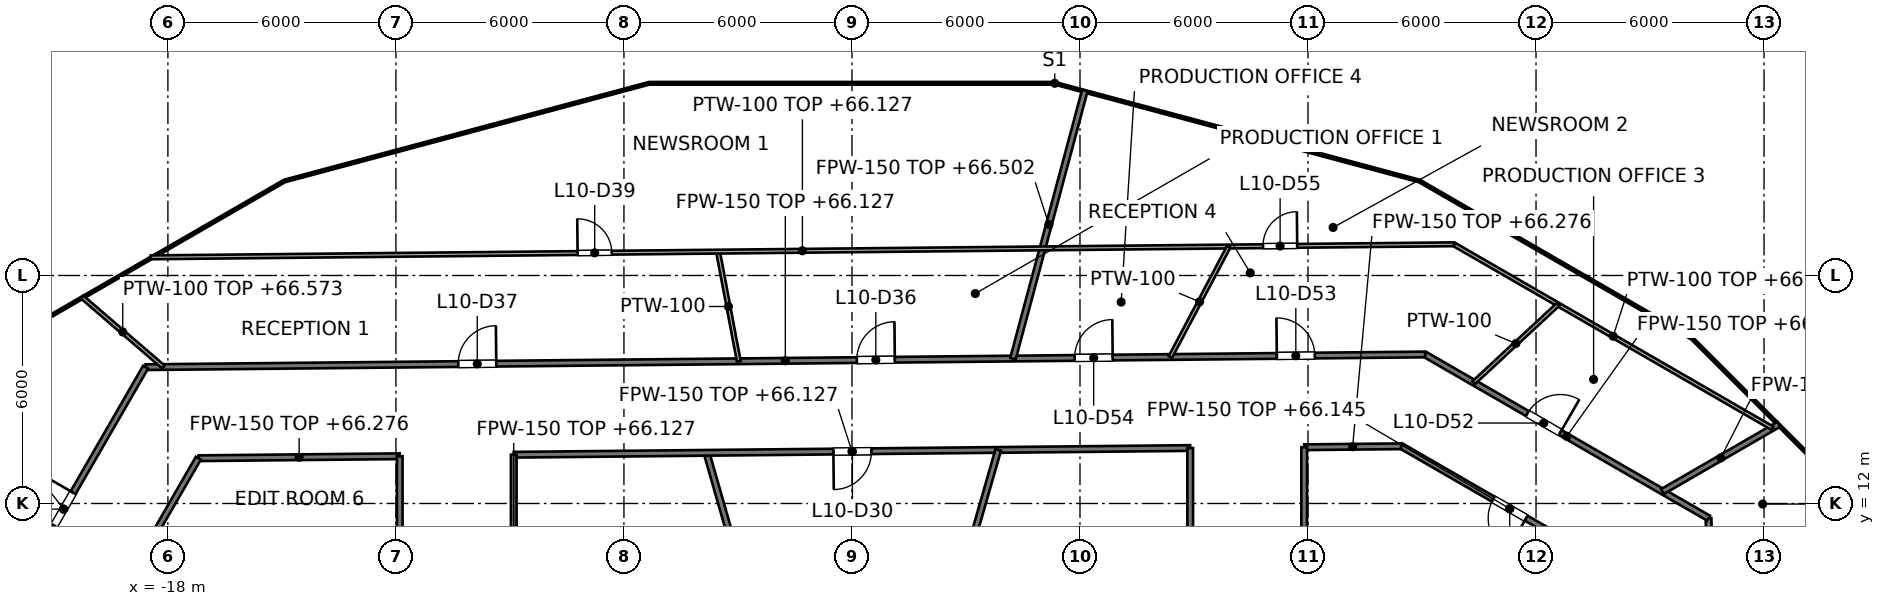
"""IFC4 building model, lengths in metres.
Left out: names, types, materials, properties, quantities, classifications, styles, units other than length and angle.
Written with IfcOpenShell. Run it as: python <this file> out.ifc"""

import sys

from ifc_helpers import new_model, si_unit, direction, frame, frame_2d, origin, place, context, subcontext, project, spatial, rectangle, extrude, element, fill, save


model = new_model("IFC4")
c1 = context("Model", 3, precision=1e-05, world=origin(), true_north=direction((0.0, 1.0)))
c2 = subcontext(c1, "Body", "Model", "MODEL_VIEW")
j1 = project(units=[si_unit("LENGTHUNIT", "METRE"), si_unit("PLANEANGLEUNIT", "RADIAN")], contexts=[c1])
p1 = place(None, origin())
s1 = spatial("IfcSite", under=j1, at=p1, CompositionType="ELEMENT")
p2 = place(p1, origin())
s2 = spatial("IfcBuilding", under=s1, at=p2, CompositionType="ELEMENT")
p3 = place(p2, frame((0.0, 0.0, 63.0)))
s3 = spatial("IfcBuildingStorey", under=s2, at=p3, CompositionType="ELEMENT", Elevation=63.0)
p4 = place(p3, frame((22.539, 11.615, 0.0), z_axis=(0.0, 0.0, 1.0), x_axis=(0.020626332176, -0.99978725458, 0.0)))
e1 = element("IfcWall", 1, at=p4, inside=s3, PredefinedType="PARTITIONING", context=c2, shape_type="SweptSolid", body=[
    extrude(rectangle(XDim=19.66, YDim=0.15, at=frame_2d((9.83, 0.0))), origin(), (0.0, 0.0, 1.0), 3.077),
])
p5 = place(p4, frame((9.33, 0.0, 0.0)))
e2 = element("IfcOpeningElement", 2, at=p5, cuts=e1, PredefinedType="OPENING", context=c2, shape_type="SweptSolid", body=[
    extrude(rectangle(XDim=1.0, YDim=2.1, at=frame_2d((0.5, 1.05))), frame((0.0, 0.075, 0.0), z_axis=(0.0, -1.0, 0.0), x_axis=(1.0, 0.0, 0.0)), (0.0, 0.0, 1.0), 0.15),
])
p6 = place(p3, frame((-3.827, 13.333, 0.0), z_axis=(0.0, 0.0, 1.0), x_axis=(0.275935525478, -0.961176147113, 0.0)))
e3 = element("IfcWall", 3, at=p6, inside=s3, PredefinedType="PARTITIONING", context=c2, shape_type="SweptSolid", body=[
    extrude(rectangle(XDim=5.548, YDim=0.15, at=frame_2d((2.774, 0.0))), origin(), (0.0, 0.0, 1.0), 4.05),
])
p7 = place(p3, frame((14.448, 13.515, 0.0), z_axis=(0.0, 0.0, 1.0), x_axis=(0.866016279763, -0.500015802937, 0.0)))
e4 = element("IfcWall", 4, at=p7, inside=s3, PredefinedType="PARTITIONING", context=c2, shape_type="SweptSolid", body=[
    extrude(rectangle(XDim=6.604, YDim=0.15, at=frame_2d((3.302, 0.0))), origin(), (0.0, 0.0, 1.0), 3.145),
])
p8 = place(p7, frame((2.802, 0.0, 0.0)))
e5 = element("IfcOpeningElement", 5, at=p8, cuts=e4, PredefinedType="OPENING", context=c2, shape_type="SweptSolid", body=[
    extrude(rectangle(XDim=1.0, YDim=2.1, at=frame_2d((0.5, 1.05))), frame((0.0, 0.075, 0.0), z_axis=(0.0, -1.0, 0.0), x_axis=(1.0, 0.0, 0.0)), (0.0, 0.0, 1.0), 0.15),
])
p9 = place(p3, frame((15.08, 15.921, 0.0), z_axis=(0.0, 0.0, 1.0), x_axis=(0.866020838546, -0.500007907142, 0.0)))
e6 = element("IfcWall", 6, at=p9, inside=s3, PredefinedType="PARTITIONING", context=c2, shape_type="SweptSolid", body=[
    extrude(rectangle(XDim=8.613, YDim=0.15, at=frame_2d((4.306, 0.0))), origin(), (0.0, 0.0, 1.0), 3.145),
])
p10 = place(p9, frame((3.108, 0.0, 0.0)))
e7 = element("IfcOpeningElement", 7, at=p10, cuts=e6, PredefinedType="OPENING", context=c2, shape_type="SweptSolid", body=[
    extrude(rectangle(XDim=1.0, YDim=2.1, at=frame_2d((0.5, 1.05))), frame((0.0, 0.075, 0.0), z_axis=(0.0, -1.0, 0.0), x_axis=(1.0, 0.0, 0.0)), (0.0, 0.0, 1.0), 0.15),
])
p11 = place(p3, frame((-17.194, 13.191, 0.0), z_axis=(0.0, 0.0, 1.0), x_axis=(0.999950394899, 0.009960308291, 0.0)))
e8 = element("IfcWall", 8, at=p11, inside=s3, PredefinedType="PARTITIONING", context=c2, shape_type="SweptSolid", body=[
    extrude(rectangle(XDim=5.294, YDim=0.15, at=frame_2d((2.647, 0.0))), origin(), (0.0, 0.0, 1.0), 3.276),
])
p12 = place(p3, frame((-8.9, 13.282, 0.0), z_axis=(0.0, 0.0, 1.0), x_axis=(0.999950697987, 0.009929833562, 0.0)))
e9 = element("IfcWall", 9, at=p12, inside=s3, PredefinedType="PARTITIONING", context=c2, shape_type="SweptSolid", body=[
    extrude(rectangle(XDim=17.801, YDim=0.15, at=frame_2d((8.9, 0.0))), origin(), (0.0, 0.0, 1.0), 3.127),
])
p13 = place(p12, frame((8.412, 0.0, 0.0)))
e10 = element("IfcOpeningElement", 10, at=p13, cuts=e9, PredefinedType="OPENING", context=c2, shape_type="SweptSolid", body=[
    extrude(rectangle(XDim=1.0, YDim=2.1, at=frame_2d((0.5, 1.05))), frame((0.0, 0.075, 0.0), z_axis=(0.0, -1.0, 0.0), x_axis=(1.0, 0.0, 0.0)), (0.0, 0.0, 1.0), 0.15),
])
p14 = place(p3, frame((11.9, 13.48, 0.0), z_axis=(0.0, 0.0, 1.0), x_axis=(0.999950357576, 0.009964054536, 0.0)))
e11 = element("IfcWall", 11, at=p14, inside=s3, PredefinedType="PARTITIONING", context=c2, shape_type="SweptSolid", body=[
    extrude(rectangle(XDim=2.548, YDim=0.15, at=frame_2d((1.274, 0.0))), origin(), (0.0, 0.0, 1.0), 3.276),
])
p15 = place(p3, frame((-18.587, 15.587, 0.0), z_axis=(0.0, 0.0, 1.0), x_axis=(0.99995065417, 0.009934245078, 0.0)))
e12 = element("IfcWall", 12, at=p15, inside=s3, PredefinedType="PARTITIONING", context=c2, shape_type="SweptSolid", body=[
    extrude(rectangle(XDim=33.669, YDim=0.15, at=frame_2d((16.834, 0.0))), origin(), (0.0, 0.0, 1.0), 3.127),
])
p16 = place(p15, frame((18.716, 0.0, 0.0)))
e13 = element("IfcOpeningElement", 13, at=p16, cuts=e12, PredefinedType="OPENING", context=c2, shape_type="SweptSolid", body=[
    extrude(rectangle(XDim=1.0, YDim=2.1, at=frame_2d((0.5, 1.05))), frame((0.0, 0.075, 0.0), z_axis=(0.0, -1.0, 0.0), x_axis=(1.0, 0.0, 0.0)), (0.0, 0.0, 1.0), 0.15),
])
p17 = place(p15, frame((8.228, 0.0, 0.0)))
e14 = element("IfcOpeningElement", 14, at=p17, cuts=e12, PredefinedType="OPENING", context=c2, shape_type="SweptSolid", body=[
    extrude(rectangle(XDim=1.0, YDim=2.1, at=frame_2d((0.5, 1.05))), frame((0.0, 0.075, 0.0), z_axis=(0.0, -1.0, 0.0), x_axis=(1.0, 0.0, 0.0)), (0.0, 0.0, 1.0), 0.15),
])
p18 = place(p15, frame((29.768, 0.0, 0.0)))
e15 = element("IfcOpeningElement", 15, at=p18, cuts=e12, PredefinedType="OPENING", context=c2, shape_type="SweptSolid", body=[
    extrude(rectangle(XDim=1.0, YDim=2.1, at=frame_2d((0.5, 1.05))), frame((0.0, 0.075, 0.0), z_axis=(0.0, -1.0, 0.0), x_axis=(1.0, 0.0, 0.0)), (0.0, 0.0, 1.0), 0.15),
])
p19 = place(p15, frame((24.449, 0.0, 0.0)))
e16 = element("IfcOpeningElement", 16, at=p19, cuts=e12, PredefinedType="OPENING", context=c2, shape_type="SweptSolid", body=[
    extrude(rectangle(XDim=1.0, YDim=2.1, at=frame_2d((0.5, 1.05))), frame((0.0, 0.075, 0.0), z_axis=(0.0, -1.0, 0.0), x_axis=(1.0, 0.0, 0.0)), (0.0, 0.0, 1.0), 0.15),
])
p20 = place(p3, frame((21.328, 12.314, 0.0), z_axis=(0.0, 0.0, 1.0), x_axis=(0.865651247195, 0.500647498975, 0.0)))
e17 = element("IfcWall", 17, at=p20, inside=s3, PredefinedType="PARTITIONING", context=c2, shape_type="SweptSolid", body=[
    extrude(rectangle(XDim=3.54, YDim=0.15, at=frame_2d((1.77, 0.0))), origin(), (0.0, 0.0, 1.0), 3.302),
])
p21 = place(p3, frame((-20.5, 7.474, 0.0), z_axis=(0.0, 0.0, 1.0), x_axis=(0.500012665616, 0.866018091164, 0.0)))
e18 = element("IfcWall", 18, at=p21, inside=s3, PredefinedType="PARTITIONING", context=c2, shape_type="SweptSolid", body=[
    extrude(rectangle(XDim=6.602, YDim=0.15, at=frame_2d((3.301, 0.0))), origin(), (0.0, 0.0, 1.0), 3.195),
])
p22 = place(p21, frame((2.803, 0.0, 0.0)))
e19 = element("IfcOpeningElement", 19, at=p22, cuts=e18, PredefinedType="OPENING", context=c2, shape_type="SweptSolid", body=[
    extrude(rectangle(XDim=1.0, YDim=2.1, at=frame_2d((0.5, 1.05))), frame((0.0, 0.075, 0.0), z_axis=(0.0, -1.0, 0.0), x_axis=(1.0, 0.0, 0.0)), (0.0, 0.0, 1.0), 0.15),
])
p23 = place(p3, frame((-22.9, 8.117, 0.0), z_axis=(0.0, 0.0, 1.0), x_axis=(0.499983791763, 0.866034761412, 0.0)))
e20 = element("IfcWall", 20, at=p23, inside=s3, PredefinedType="PARTITIONING", context=c2, shape_type="SweptSolid", body=[
    extrude(rectangle(XDim=8.626, YDim=0.15, at=frame_2d((4.313, 0.0))), origin(), (0.0, 0.0, 1.0), 3.195),
])
p24 = place(p23, frame((3.812, 0.0, 0.0)))
e21 = element("IfcOpeningElement", 21, at=p24, cuts=e20, PredefinedType="OPENING", context=c2, shape_type="SweptSolid", body=[
    extrude(rectangle(XDim=1.0, YDim=2.1, at=frame_2d((0.5, 1.05))), frame((0.0, 0.075, 0.0), z_axis=(0.0, -1.0, 0.0), x_axis=(1.0, 0.0, 0.0)), (0.0, 0.0, 1.0), 0.15),
])
p25 = place(p3, frame((2.296, 8.0, 0.0), z_axis=(0.0, 0.0, 1.0), x_axis=(0.275958345059, 0.961169595749, 0.0)))
e22 = element("IfcWall", 22, at=p25, inside=s3, PredefinedType="PARTITIONING", context=c2, shape_type="SweptSolid", body=[
    extrude(rectangle(XDim=5.628, YDim=0.15, at=frame_2d((2.814, 0.0))), origin(), (0.0, 0.0, 1.0), 4.05),
])
p26 = place(p3, frame((4.237, 15.813, 0.0), z_axis=(0.0, 0.0, 1.0), x_axis=(0.258856971965, 0.965915663019, 0.0)))
e23 = element("IfcWall", 23, at=p26, inside=s3, PredefinedType="PARTITIONING", context=c2, shape_type="SweptSolid", body=[
    extrude(rectangle(XDim=7.302, YDim=0.15, at=frame_2d((3.651, 0.0))), origin(), (0.0, 0.0, 1.0), 3.502),
])
p27 = place(p3, frame((11.9, 8.0, 0.0), z_axis=(0.0, 0.0, 1.0), x_axis=(0.0, 1.0, 0.0)))
e24 = element("IfcWall", 24, at=p27, inside=s3, PredefinedType="PARTITIONING", context=c2, shape_type="SweptSolid", body=[
    extrude(rectangle(XDim=5.479, YDim=0.15, at=frame_2d((2.74, 0.0))), origin(), (0.0, 0.0, 1.0), 3.145),
])
p28 = place(p3, frame((8.9, 8.0, 0.0), z_axis=(0.0, 0.0, 1.0), x_axis=(0.0, 1.0, 0.0)))
e25 = element("IfcWall", 25, at=p28, inside=s3, PredefinedType="PARTITIONING", context=c2, shape_type="SweptSolid", body=[
    extrude(rectangle(XDim=5.46, YDim=0.15, at=frame_2d((2.73, 0.0))), origin(), (0.0, 0.0, 1.0), 3.127),
])
p29 = place(p28, frame((2.23, 0.0, 0.0)))
e26 = element("IfcOpeningElement", 26, at=p29, cuts=e25, PredefinedType="OPENING", context=c2, shape_type="SweptSolid", body=[
    extrude(rectangle(XDim=1.0, YDim=2.1, at=frame_2d((0.5, 1.05))), frame((0.0, 0.075, 0.0), z_axis=(0.0, -1.0, 0.0), x_axis=(1.0, 0.0, 0.0)), (0.0, 0.0, 1.0), 0.15),
])
p30 = place(p3, frame((-8.9, 8.0, 0.0), z_axis=(0.0, 0.0, 1.0), x_axis=(0.0, 1.0, 0.0)))
e27 = element("IfcWall", 27, at=p30, inside=s3, PredefinedType="PARTITIONING", context=c2, shape_type="SweptSolid", body=[
    extrude(rectangle(XDim=5.283, YDim=0.15, at=frame_2d((2.642, 0.0))), origin(), (0.0, 0.0, 1.0), 3.127),
])
p31 = place(p30, frame((2.142, 0.0, 0.0)))
e28 = element("IfcOpeningElement", 28, at=p31, cuts=e27, PredefinedType="OPENING", context=c2, shape_type="SweptSolid", body=[
    extrude(rectangle(XDim=1.0, YDim=2.1, at=frame_2d((0.5, 1.05))), frame((0.0, 0.075, 0.0), z_axis=(0.0, -1.0, 0.0), x_axis=(1.0, 0.0, 0.0)), (0.0, 0.0, 1.0), 0.15),
])
p32 = place(p3, frame((-11.9, 8.0, 0.0), z_axis=(0.0, 0.0, 1.0), x_axis=(0.0, 1.0, 0.0)))
e29 = element("IfcWall", 29, at=p32, inside=s3, PredefinedType="PARTITIONING", context=c2, shape_type="SweptSolid", body=[
    extrude(rectangle(XDim=5.243, YDim=0.15, at=frame_2d((2.622, 0.0))), origin(), (0.0, 0.0, 1.0), 3.195),
])
p33 = place(p3, frame((-3.524, 18.626, 0.0), z_axis=(0.0, 0.0, 1.0), x_axis=(0.185980649988, -0.982553407113, 0.0)))
e30 = element("IfcWall", 30, at=p33, inside=s3, PredefinedType="PARTITIONING", context=c2, shape_type="SweptSolid", body=[
    extrude(rectangle(XDim=2.935, YDim=0.1, at=frame_2d((1.468, 0.0))), origin(), (0.0, 0.0, 1.0), 4.05),
])
p34 = place(p3, frame((-20.259, 17.434, 0.0), z_axis=(0.0, 0.0, 1.0), x_axis=(0.758065533123, -0.65217838625, 0.0)))
e31 = element("IfcWall", 31, at=p34, inside=s3, PredefinedType="PARTITIONING", context=c2, shape_type="SweptSolid", body=[
    extrude(rectangle(XDim=2.824, YDim=0.1, at=frame_2d((1.412, 0.0))), origin(), (0.0, 0.0, 1.0), 3.573),
])
p35 = place(p3, frame((15.841, 18.819, 0.0), z_axis=(0.0, 0.0, 1.0), x_axis=(0.865993079611, -0.500055982931, 0.0)))
e32 = element("IfcWall", 32, at=p35, inside=s3, PredefinedType="PARTITIONING", context=c2, shape_type="SweptSolid", body=[
    extrude(rectangle(XDim=9.673, YDim=0.1, at=frame_2d((4.837, 0.0))), origin(), (0.0, 0.0, 1.0), 3.145),
])
p36 = place(p3, frame((-18.45, 18.478, 0.0), z_axis=(0.0, 0.0, 1.0), x_axis=(0.999949972423, 0.010002632221, 0.0)))
e33 = element("IfcWall", 33, at=p36, inside=s3, PredefinedType="PARTITIONING", context=c2, shape_type="SweptSolid", body=[
    extrude(rectangle(XDim=34.293, YDim=0.1, at=frame_2d((17.146, 0.0))), origin(), (0.0, 0.0, 1.0), 3.127),
])
p37 = place(p36, frame((11.231, 0.0, 0.0)))
e34 = element("IfcOpeningElement", 34, at=p37, cuts=e33, PredefinedType="OPENING", context=c2, shape_type="SweptSolid", body=[
    extrude(rectangle(XDim=0.9, YDim=2.1, at=frame_2d((0.45, 1.05))), frame((0.0, 0.05, 0.0), z_axis=(0.0, -1.0, 0.0), x_axis=(1.0, 0.0, 0.0)), (0.0, 0.0, 1.0), 0.1),
])
p38 = place(p36, frame((29.268, 0.0, 0.0)))
e35 = element("IfcOpeningElement", 35, at=p38, cuts=e33, PredefinedType="OPENING", context=c2, shape_type="SweptSolid", body=[
    extrude(rectangle(XDim=0.9, YDim=2.1, at=frame_2d((0.45, 1.05))), frame((0.0, 0.05, 0.0), z_axis=(0.0, -1.0, 0.0), x_axis=(1.0, 0.0, 0.0)), (0.0, 0.0, 1.0), 0.1),
])
p39 = place(p3, frame((16.362, 15.181, 0.0), z_axis=(0.0, 0.0, 1.0), x_axis=(0.733049321978, 0.680175485848, 0.0)))
e36 = element("IfcWall", 36, at=p39, inside=s3, PredefinedType="PARTITIONING", context=c2, shape_type="SweptSolid", body=[
    extrude(rectangle(XDim=3.024, YDim=0.1, at=frame_2d((1.512, 0.0))), origin(), (0.0, 0.0, 1.0), 4.05),
])
p40 = place(p3, frame((8.379, 15.855, 0.0), z_axis=(0.0, 0.0, 1.0), x_axis=(0.467454152029, 0.884017316432, 0.0)))
e37 = element("IfcWall", 37, at=p40, inside=s3, PredefinedType="PARTITIONING", context=c2, shape_type="SweptSolid", body=[
    extrude(rectangle(XDim=3.286, YDim=0.1, at=frame_2d((1.643, 0.0))), origin(), (0.0, 0.0, 1.0), 4.05),
])
p41 = place(p8, origin())
e38 = element("IfcDoor", 38, at=p41, inside=s3, OperationType="SINGLE_SWING_RIGHT", PredefinedType="DOOR", context=c2, shape_type="SweptSolid", body=[
    extrude(rectangle(XDim=1.0, YDim=2.1, at=frame_2d((0.5, 1.05))), frame((0.0, 0.025, 0.0), z_axis=(0.0, -1.0, 0.0), x_axis=(1.0, 0.0, 0.0)), (0.0, 0.0, 1.0), 0.05),
])
fill(e5, e38)
p42 = place(p13, origin())
e39 = element("IfcDoor", 39, at=p42, inside=s3, OperationType="SINGLE_SWING_LEFT", PredefinedType="DOOR", context=c2, shape_type="SweptSolid", body=[
    extrude(rectangle(XDim=1.0, YDim=2.1, at=frame_2d((0.5, 1.05))), frame((0.0, 0.025, 0.0), z_axis=(0.0, -1.0, 0.0), x_axis=(1.0, 0.0, 0.0)), (0.0, 0.0, 1.0), 0.05),
])
fill(e10, e39)
p43 = place(p16, origin())
e40 = element("IfcDoor", 40, at=p43, inside=s3, OperationType="SINGLE_SWING_RIGHT", PredefinedType="DOOR", context=c2, shape_type="SweptSolid", body=[
    extrude(rectangle(XDim=1.0, YDim=2.1, at=frame_2d((0.5, 1.05))), frame((0.0, 0.025, 0.0), z_axis=(0.0, -1.0, 0.0), x_axis=(1.0, 0.0, 0.0)), (0.0, 0.0, 1.0), 0.05),
])
fill(e13, e40)
p44 = place(p17, origin())
e41 = element("IfcDoor", 41, at=p44, inside=s3, OperationType="SINGLE_SWING_RIGHT", PredefinedType="DOOR", context=c2, shape_type="SweptSolid", body=[
    extrude(rectangle(XDim=1.0, YDim=2.1, at=frame_2d((0.5, 1.05))), frame((0.0, 0.025, 0.0), z_axis=(0.0, -1.0, 0.0), x_axis=(1.0, 0.0, 0.0)), (0.0, 0.0, 1.0), 0.05),
])
fill(e14, e41)
p45 = place(p24, origin())
e42 = element("IfcDoor", 42, at=p45, inside=s3, OperationType="SINGLE_SWING_RIGHT", PredefinedType="DOOR", context=c2, shape_type="SweptSolid", body=[
    extrude(rectangle(XDim=1.0, YDim=2.1, at=frame_2d((0.5, 1.05))), frame((0.0, 0.025, 0.0), z_axis=(0.0, -1.0, 0.0), x_axis=(1.0, 0.0, 0.0)), (0.0, 0.0, 1.0), 0.05),
])
fill(e21, e42)
p46 = place(p37, origin())
e43 = element("IfcDoor", 43, at=p46, inside=s3, OperationType="SINGLE_SWING_LEFT", PredefinedType="DOOR", context=c2, shape_type="SweptSolid", body=[
    extrude(rectangle(XDim=0.9, YDim=2.1, at=frame_2d((0.45, 1.05))), frame((0.0, 0.025, 0.0), z_axis=(0.0, -1.0, 0.0), x_axis=(1.0, 0.0, 0.0)), (0.0, 0.0, 1.0), 0.05),
])
fill(e34, e43)
p47 = place(p10, origin())
e44 = element("IfcDoor", 44, at=p47, inside=s3, OperationType="SINGLE_SWING_RIGHT", PredefinedType="DOOR", context=c2, shape_type="SweptSolid", body=[
    extrude(rectangle(XDim=1.0, YDim=2.1, at=frame_2d((0.5, 1.05))), frame((0.0, 0.025, 0.0), z_axis=(0.0, -1.0, 0.0), x_axis=(1.0, 0.0, 0.0)), (0.0, 0.0, 1.0), 0.05),
])
fill(e7, e44)
p48 = place(p18, origin())
e45 = element("IfcDoor", 45, at=p48, inside=s3, OperationType="SINGLE_SWING_LEFT", PredefinedType="DOOR", context=c2, shape_type="SweptSolid", body=[
    extrude(rectangle(XDim=1.0, YDim=2.1, at=frame_2d((0.5, 1.05))), frame((0.0, 0.025, 0.0), z_axis=(0.0, -1.0, 0.0), x_axis=(1.0, 0.0, 0.0)), (0.0, 0.0, 1.0), 0.05),
])
fill(e15, e45)
p49 = place(p19, origin())
e46 = element("IfcDoor", 46, at=p49, inside=s3, OperationType="SINGLE_SWING_RIGHT", PredefinedType="DOOR", context=c2, shape_type="SweptSolid", body=[
    extrude(rectangle(XDim=1.0, YDim=2.1, at=frame_2d((0.5, 1.05))), frame((0.0, 0.025, 0.0), z_axis=(0.0, -1.0, 0.0), x_axis=(1.0, 0.0, 0.0)), (0.0, 0.0, 1.0), 0.05),
])
fill(e16, e46)
p50 = place(p38, origin())
e47 = element("IfcDoor", 47, at=p50, inside=s3, OperationType="SINGLE_SWING_RIGHT", PredefinedType="DOOR", context=c2, shape_type="SweptSolid", body=[
    extrude(rectangle(XDim=0.9, YDim=2.1, at=frame_2d((0.45, 1.05))), frame((0.0, 0.025, 0.0), z_axis=(0.0, -1.0, 0.0), x_axis=(1.0, 0.0, 0.0)), (0.0, 0.0, 1.0), 0.05),
])
fill(e35, e47)
save(model, sys.argv[1])
